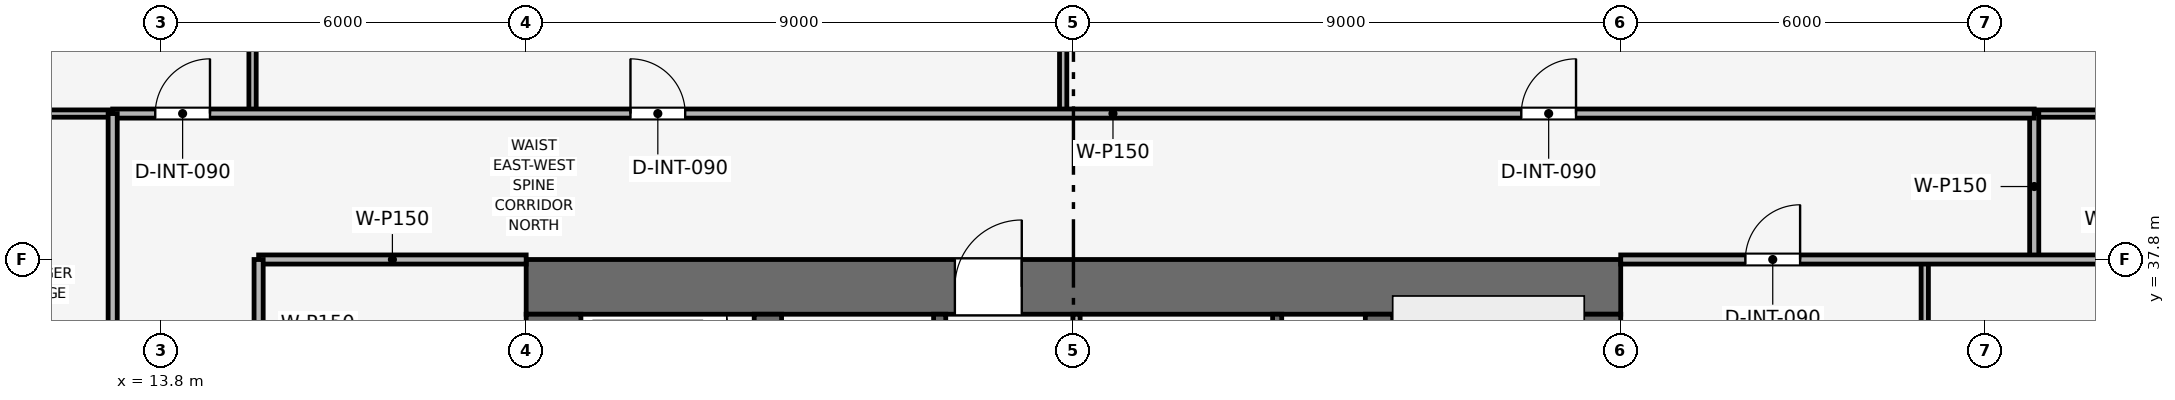
"""IFC4 building model, lengths in metres.
Left out: names, types, materials, properties, quantities, classifications, styles, units other than length and angle.
Written with IfcOpenShell. Run it as: python <this file> out.ifc"""

import sys

from ifc_helpers import new_model, si_unit, direction, frame, frame_2d, origin, place, context, subcontext, project, spatial, rectangle, extrude, element, fill, save


model = new_model("IFC4")
c1 = context("Model", 3, precision=1e-05, world=origin(), true_north=direction((0.0, 1.0)))
c2 = subcontext(c1, "Body", "Model", "MODEL_VIEW")
j1 = project(units=[si_unit("LENGTHUNIT", "METRE"), si_unit("PLANEANGLEUNIT", "RADIAN")], contexts=[c1])
p1 = place(None, origin())
s1 = spatial("IfcSite", under=j1, at=p1, CompositionType="ELEMENT")
p2 = place(p1, origin())
s2 = spatial("IfcBuilding", under=s1, at=p2, CompositionType="ELEMENT")
p3 = place(p2, frame((0.0, 0.0, 153.3)))
s3 = spatial("IfcBuildingStorey", under=s2, at=p3, CompositionType="ELEMENT", Elevation=153.3)
p4 = place(p3, frame((19.8, 37.35, 0.0), z_axis=(0.0, 0.0, 1.0), x_axis=(1.0, 0.0, 0.0)))
e1 = element("IfcWall", 1, at=p4, inside=s3, PredefinedType="SHEAR", context=c2, shape_type="SweptSolid", body=[
    extrude(rectangle(XDim=18.0, YDim=0.9, at=frame_2d((9.0, 0.0))), origin(), (0.0, 0.0, 1.0), 3.75),
])
p5 = place(p4, frame((7.05, 0.0, 0.0)))
e2 = element("IfcOpeningElement", 2, at=p5, cuts=e1, PredefinedType="OPENING", context=c2, shape_type="SweptSolid", body=[
    extrude(rectangle(XDim=1.1, YDim=2.15, at=frame_2d((0.55, 1.075))), frame((0.0, 0.46, 0.0), z_axis=(0.0, -1.0, 0.0), x_axis=(1.0, 0.0, 0.0)), (0.0, 0.0, 1.0), 0.92),
])
p6 = place(p3, frame((20.25, 20.7, 0.0), z_axis=(0.0, 0.0, 1.0), x_axis=(0.0, 1.0, 0.0)))
e3 = element("IfcWall", 3, at=p6, inside=s3, PredefinedType="SHEAR", context=c2, shape_type="SweptSolid", body=[
    extrude(rectangle(XDim=16.2, YDim=0.9, at=frame_2d((8.1, 0.0))), origin(), (0.0, 0.0, 1.0), 3.75),
])
p7 = place(p6, frame((10.1, 0.0, 0.0)))
e4 = element("IfcOpeningElement", 4, at=p7, cuts=e3, PredefinedType="OPENING", context=c2, shape_type="SweptSolid", body=[
    extrude(rectangle(XDim=1.1, YDim=2.15, at=frame_2d((0.55, 1.075))), frame((0.0, 0.46, 0.0), z_axis=(0.0, -1.0, 0.0), x_axis=(1.0, 0.0, 0.0)), (0.0, 0.0, 1.0), 0.92),
])
p8 = place(p3, frame((37.35, 20.7, 0.0), z_axis=(0.0, 0.0, 1.0), x_axis=(0.0, 1.0, 0.0)))
e5 = element("IfcWall", 5, at=p8, inside=s3, PredefinedType="SHEAR", context=c2, shape_type="SweptSolid", body=[
    extrude(rectangle(XDim=16.2, YDim=0.9, at=frame_2d((8.1, 0.0))), origin(), (0.0, 0.0, 1.0), 3.75),
])
p9 = place(p8, frame((4.6, 0.0, 0.0)))
e6 = element("IfcOpeningElement", 6, at=p9, cuts=e5, PredefinedType="OPENING", context=c2, shape_type="SweptSolid", body=[
    extrude(rectangle(XDim=1.1, YDim=2.15, at=frame_2d((0.55, 1.075))), frame((0.0, 0.46, 0.0), z_axis=(0.0, -1.0, 0.0), x_axis=(1.0, 0.0, 0.0)), (0.0, 0.0, 1.0), 0.92),
])
for number, where, z_axis, x_axis in (
    (7, (23.775, 20.7, 0.0), (0.0, 0.0, 1.0), (0.0, 1.0, 0.0)),
    (8, (33.825, 20.7, 0.0), (0.0, 0.0, 1.0), (0.0, 1.0, 0.0)),
):
    element("IfcWall", number, at=place(p3, frame(where, z_axis=z_axis, x_axis=x_axis)), inside=s3, PredefinedType="SHEAR", context=c2, shape_type="SweptSolid", body=[
        extrude(rectangle(XDim=16.2, YDim=0.45, at=frame_2d((8.1, 0.0))), origin(), (0.0, 0.0, 1.0), 3.75),
    ])
p10 = place(p3, frame((32.15, 34.0, 0.0), z_axis=(0.0, 0.0, 1.0), x_axis=(0.0, 1.0, 0.0)))
e9 = element("IfcWall", 9, at=p10, inside=s3, PredefinedType="SHEAR", context=c2, shape_type="SweptSolid", body=[
    extrude(rectangle(XDim=2.9, YDim=0.15, at=frame_2d((1.45, 0.0))), origin(), (0.0, 0.0, 1.0), 3.495),
])
p11 = place(p3, frame((26.6, 34.0, 0.0), z_axis=(0.0, 0.0, 1.0), x_axis=(0.0, 1.0, 0.0)))
e10 = element("IfcWall", 10, at=p11, inside=s3, PredefinedType="SHEAR", context=c2, shape_type="SweptSolid", body=[
    extrude(rectangle(XDim=2.9, YDim=0.2, at=frame_2d((1.45, 0.0))), origin(), (0.0, 0.0, 1.0), 3.495),
])
p12 = place(p11, frame((0.75, 0.0, 0.0)))
e11 = element("IfcOpeningElement", 11, at=p12, cuts=e10, PredefinedType="OPENING", context=c2, shape_type="SweptSolid", body=[
    extrude(rectangle(XDim=1.1, YDim=2.15, at=frame_2d((0.55, 1.075))), frame((0.0, 0.11, 0.0), z_axis=(0.0, -1.0, 0.0), x_axis=(1.0, 0.0, 0.0)), (0.0, 0.0, 1.0), 0.22),
])
p13 = place(p3, frame((28.85, 33.925, 0.0), z_axis=(0.0, 0.0, 1.0), x_axis=(0.0, 1.0, 0.0)))
e12 = element("IfcWall", 12, at=p13, inside=s3, PredefinedType="PARTITIONING", context=c2, shape_type="SweptSolid", body=[
    extrude(rectangle(XDim=2.975, YDim=0.12, at=frame_2d((1.487, 0.0))), origin(), (0.0, 0.0, 1.0), 3.495),
])
p14 = place(p13, frame((0.25, 0.0, 0.0)))
e13 = element("IfcOpeningElement", 13, at=p14, cuts=e12, PredefinedType="OPENING", context=c2, shape_type="SweptSolid", body=[
    extrude(rectangle(XDim=0.85, YDim=2.1, at=frame_2d((0.425, 1.05))), frame((0.0, 0.07, 0.0), z_axis=(0.0, -1.0, 0.0), x_axis=(1.0, 0.0, 0.0)), (0.0, 0.0, 1.0), 0.14),
])
p15 = place(p13, frame((1.645, 0.0, 0.0)))
e14 = element("IfcOpeningElement", 14, at=p15, cuts=e12, PredefinedType="OPENING", context=c2, shape_type="SweptSolid", body=[
    extrude(rectangle(XDim=0.85, YDim=2.1, at=frame_2d((0.425, 1.05))), frame((0.0, 0.07, 0.0), z_axis=(0.0, -1.0, 0.0), x_axis=(1.0, 0.0, 0.0)), (0.0, 0.0, 1.0), 0.14),
])
p16 = place(p3, frame((15.4, 37.8, 0.0), z_axis=(0.0, 0.0, 1.0), x_axis=(1.0, 0.0, 0.0)))
e15 = element("IfcWall", 15, at=p16, inside=s3, PredefinedType="PARTITIONING", context=c2, shape_type="SweptSolid", body=[
    extrude(rectangle(XDim=4.4, YDim=0.15, at=frame_2d((2.2, 0.0))), origin(), (0.0, 0.0, 1.0), 3.03),
])
p17 = place(p3, frame((15.4, 32.45, 0.0), z_axis=(0.0, 0.0, 1.0), x_axis=(0.0, 1.0, 0.0)))
e16 = element("IfcWall", 16, at=p17, inside=s3, PredefinedType="PARTITIONING", context=c2, shape_type="SweptSolid", body=[
    extrude(rectangle(XDim=5.35, YDim=0.15, at=frame_2d((2.675, 0.0))), origin(), (0.0, 0.0, 1.0), 3.03),
])
p18 = place(p17, frame((2.1, 0.0, 0.0)))
e17 = element("IfcOpeningElement", 17, at=p18, cuts=e16, PredefinedType="OPENING", context=c2, shape_type="SweptSolid", body=[
    extrude(rectangle(XDim=0.9, YDim=2.1, at=frame_2d((0.45, 1.05))), frame((0.0, 0.085, 0.0), z_axis=(0.0, -1.0, 0.0), x_axis=(1.0, 0.0, 0.0)), (0.0, 0.0, 1.0), 0.17),
])
for number, where, z_axis, x_axis in (
    (18, (15.3, 40.2, 0.0), (0.0, 0.0, 1.0), (0.0, 1.0, 0.0)),
    (19, (28.631, 40.2, 0.0), (0.0, 0.0, 1.0), (0.0, 1.0, 0.0)),
):
    element("IfcWall", number, at=place(p3, frame(where, z_axis=z_axis, x_axis=x_axis)), inside=s3, PredefinedType="PARTITIONING", context=c2, shape_type="SweptSolid", body=[
        extrude(rectangle(XDim=12.77, YDim=0.12, at=frame_2d((6.385, 0.0))), origin(), (0.0, 0.0, 1.0), 2.98),
    ])
p19 = place(p3, frame((42.8, 26.85, 0.0), z_axis=(0.0, 0.0, 1.0), x_axis=(0.0, 1.0, 0.0)))
e20 = element("IfcWall", 20, at=p19, inside=s3, PredefinedType="PARTITIONING", context=c2, shape_type="SweptSolid", body=[
    extrude(rectangle(XDim=10.95, YDim=0.12, at=frame_2d((5.475, 0.0))), origin(), (0.0, 0.0, 1.0), 3.03),
])
p20 = place(p19, frame((5.025, 0.0, 0.0)))
e21 = element("IfcOpeningElement", 21, at=p20, cuts=e20, PredefinedType="OPENING", context=c2, shape_type="SweptSolid", body=[
    extrude(rectangle(XDim=0.9, YDim=2.1, at=frame_2d((0.45, 1.05))), frame((0.0, 0.07, 0.0), z_axis=(0.0, -1.0, 0.0), x_axis=(1.0, 0.0, 0.0)), (0.0, 0.0, 1.0), 0.14),
])
p21 = place(p3, frame((4.63, 40.2, 0.0), z_axis=(0.0, 0.0, 1.0), x_axis=(1.0, 0.0, 0.0)))
e22 = element("IfcWall", 22, at=p21, inside=s3, PredefinedType="PARTITIONING", context=c2, shape_type="SweptSolid", body=[
    extrude(rectangle(XDim=8.37, YDim=0.12, at=frame_2d((4.185, 0.0))), origin(), (0.0, 0.0, 1.0), 2.98),
])
p22 = place(p3, frame((44.6, 40.2, 0.0), z_axis=(0.0, 0.0, 1.0), x_axis=(1.0, 0.0, 0.0)))
e23 = element("IfcWall", 23, at=p22, inside=s3, PredefinedType="PARTITIONING", context=c2, shape_type="SweptSolid", body=[
    extrude(rectangle(XDim=8.37, YDim=0.12, at=frame_2d((4.185, 0.0))), origin(), (0.0, 0.0, 1.0), 2.98),
])
p23 = place(p3, frame((44.6, 37.8, 0.0), z_axis=(0.0, 0.0, 1.0), x_axis=(0.0, 1.0, 0.0)))
e24 = element("IfcWall", 24, at=p23, inside=s3, PredefinedType="PARTITIONING", context=c2, shape_type="SweptSolid", body=[
    extrude(rectangle(XDim=2.4, YDim=0.15, at=frame_2d((1.2, 0.0))), origin(), (0.0, 0.0, 1.0), 3.495),
])
p24 = place(p3, frame((37.8, 37.8, 0.0), z_axis=(0.0, 0.0, 1.0), x_axis=(1.0, 0.0, 0.0)))
e25 = element("IfcWall", 25, at=p24, inside=s3, PredefinedType="PARTITIONING", context=c2, shape_type="SweptSolid", body=[
    extrude(rectangle(XDim=15.17, YDim=0.15, at=frame_2d((7.585, 0.0))), origin(), (0.0, 0.0, 1.0), 2.98),
])
p25 = place(p24, frame((2.05, 0.0, 0.0)))
e26 = element("IfcOpeningElement", 26, at=p25, cuts=e25, PredefinedType="OPENING", context=c2, shape_type="SweptSolid", body=[
    extrude(rectangle(XDim=0.9, YDim=2.1, at=frame_2d((0.45, 1.05))), frame((0.0, 0.085, 0.0), z_axis=(0.0, -1.0, 0.0), x_axis=(1.0, 0.0, 0.0)), (0.0, 0.0, 1.0), 0.17),
])
p26 = place(p3, frame((13.0, 40.2, 0.0), z_axis=(0.0, 0.0, 1.0), x_axis=(1.0, 0.0, 0.0)))
e27 = element("IfcWall", 27, at=p26, inside=s3, PredefinedType="PARTITIONING", context=c2, shape_type="SweptSolid", body=[
    extrude(rectangle(XDim=31.6, YDim=0.15, at=frame_2d((15.8, 0.0))), origin(), (0.0, 0.0, 1.0), 3.03),
])
p27 = place(p26, frame((0.7, 0.0, 0.0)))
e28 = element("IfcOpeningElement", 28, at=p27, cuts=e27, PredefinedType="OPENING", context=c2, shape_type="SweptSolid", body=[
    extrude(rectangle(XDim=0.9, YDim=2.1, at=frame_2d((0.45, 1.05))), frame((0.0, 0.085, 0.0), z_axis=(0.0, -1.0, 0.0), x_axis=(1.0, 0.0, 0.0)), (0.0, 0.0, 1.0), 0.17),
])
p28 = place(p26, frame((8.515, 0.0, 0.0)))
e29 = element("IfcOpeningElement", 29, at=p28, cuts=e27, PredefinedType="OPENING", context=c2, shape_type="SweptSolid", body=[
    extrude(rectangle(XDim=0.9, YDim=2.1, at=frame_2d((0.45, 1.05))), frame((0.0, 0.085, 0.0), z_axis=(0.0, -1.0, 0.0), x_axis=(1.0, 0.0, 0.0)), (0.0, 0.0, 1.0), 0.17),
])
p29 = place(p26, frame((23.165, 0.0, 0.0)))
e30 = element("IfcOpeningElement", 30, at=p29, cuts=e27, PredefinedType="OPENING", context=c2, shape_type="SweptSolid", body=[
    extrude(rectangle(XDim=0.9, YDim=2.1, at=frame_2d((0.45, 1.05))), frame((0.0, 0.085, 0.0), z_axis=(0.0, -1.0, 0.0), x_axis=(1.0, 0.0, 0.0)), (0.0, 0.0, 1.0), 0.17),
])
p30 = place(p3, frame((13.0, 17.4, 0.0), z_axis=(0.0, 0.0, 1.0), x_axis=(0.0, 1.0, 0.0)))
e31 = element("IfcWall", 31, at=p30, inside=s3, PredefinedType="PARTITIONING", context=c2, shape_type="SweptSolid", body=[
    extrude(rectangle(XDim=22.8, YDim=0.15, at=frame_2d((11.4, 0.0))), origin(), (0.0, 0.0, 1.0), 3.03),
])
p31 = place(p30, frame((3.191, 0.0, 0.0)))
e32 = element("IfcOpeningElement", 32, at=p31, cuts=e31, PredefinedType="OPENING", context=c2, shape_type="SweptSolid", body=[
    extrude(rectangle(XDim=0.9, YDim=2.1, at=frame_2d((0.45, 1.05))), frame((0.0, 0.085, 0.0), z_axis=(0.0, -1.0, 0.0), x_axis=(1.0, 0.0, 0.0)), (0.0, 0.0, 1.0), 0.17),
])
p32 = place(p30, frame((6.581, 0.0, 0.0)))
e33 = element("IfcOpeningElement", 33, at=p32, cuts=e31, PredefinedType="OPENING", context=c2, shape_type="SweptSolid", body=[
    extrude(rectangle(XDim=0.9, YDim=2.1, at=frame_2d((0.45, 1.05))), frame((0.0, 0.085, 0.0), z_axis=(0.0, -1.0, 0.0), x_axis=(1.0, 0.0, 0.0)), (0.0, 0.0, 1.0), 0.17),
])
p33 = place(p30, frame((10.878, 0.0, 0.0)))
e34 = element("IfcOpeningElement", 34, at=p33, cuts=e31, PredefinedType="OPENING", context=c2, shape_type="SweptSolid", body=[
    extrude(rectangle(XDim=0.9, YDim=2.1, at=frame_2d((0.45, 1.05))), frame((0.0, 0.085, 0.0), z_axis=(0.0, -1.0, 0.0), x_axis=(1.0, 0.0, 0.0)), (0.0, 0.0, 1.0), 0.17),
])
p34 = place(p30, frame((16.488, 0.0, 0.0)))
e35 = element("IfcOpeningElement", 35, at=p34, cuts=e31, PredefinedType="OPENING", context=c2, shape_type="SweptSolid", body=[
    extrude(rectangle(XDim=0.9, YDim=2.1, at=frame_2d((0.45, 1.05))), frame((0.0, 0.085, 0.0), z_axis=(0.0, -1.0, 0.0), x_axis=(1.0, 0.0, 0.0)), (0.0, 0.0, 1.0), 0.17),
])
p35 = place(p25, origin())
e36 = element("IfcDoor", 36, at=p35, inside=s3, OperationType="SINGLE_SWING_RIGHT", PredefinedType="DOOR", context=c2, shape_type="SweptSolid", body=[
    extrude(rectangle(XDim=0.9, YDim=2.1, at=frame_2d((0.45, 1.05))), frame((0.0, 0.025, 0.0), z_axis=(0.0, -1.0, 0.0), x_axis=(1.0, 0.0, 0.0)), (0.0, 0.0, 1.0), 0.05),
])
fill(e26, e36)
p36 = place(p27, origin())
e37 = element("IfcDoor", 37, at=p36, inside=s3, OperationType="SINGLE_SWING_RIGHT", PredefinedType="DOOR", context=c2, shape_type="SweptSolid", body=[
    extrude(rectangle(XDim=0.9, YDim=2.1, at=frame_2d((0.45, 1.05))), frame((0.0, 0.025, 0.0), z_axis=(0.0, -1.0, 0.0), x_axis=(1.0, 0.0, 0.0)), (0.0, 0.0, 1.0), 0.05),
])
fill(e28, e37)
p37 = place(p28, origin())
e38 = element("IfcDoor", 38, at=p37, inside=s3, OperationType="SINGLE_SWING_LEFT", PredefinedType="DOOR", context=c2, shape_type="SweptSolid", body=[
    extrude(rectangle(XDim=0.9, YDim=2.1, at=frame_2d((0.45, 1.05))), frame((0.0, 0.025, 0.0), z_axis=(0.0, -1.0, 0.0), x_axis=(1.0, 0.0, 0.0)), (0.0, 0.0, 1.0), 0.05),
])
fill(e29, e38)
p38 = place(p29, origin())
e39 = element("IfcDoor", 39, at=p38, inside=s3, OperationType="SINGLE_SWING_RIGHT", PredefinedType="DOOR", context=c2, shape_type="SweptSolid", body=[
    extrude(rectangle(XDim=0.9, YDim=2.1, at=frame_2d((0.45, 1.05))), frame((0.0, 0.025, 0.0), z_axis=(0.0, -1.0, 0.0), x_axis=(1.0, 0.0, 0.0)), (0.0, 0.0, 1.0), 0.05),
])
fill(e30, e39)
p39 = place(p5, origin())
e40 = element("IfcDoor", 40, at=p39, inside=s3, OperationType="SINGLE_SWING_RIGHT", PredefinedType="DOOR", context=c2, shape_type="SweptSolid", body=[
    extrude(rectangle(XDim=1.1, YDim=2.15, at=frame_2d((0.55, 1.075))), frame((0.0, 0.025, 0.0), z_axis=(0.0, -1.0, 0.0), x_axis=(1.0, 0.0, 0.0)), (0.0, 0.0, 1.0), 0.05),
])
fill(e2, e40)
save(model, sys.argv[1])
